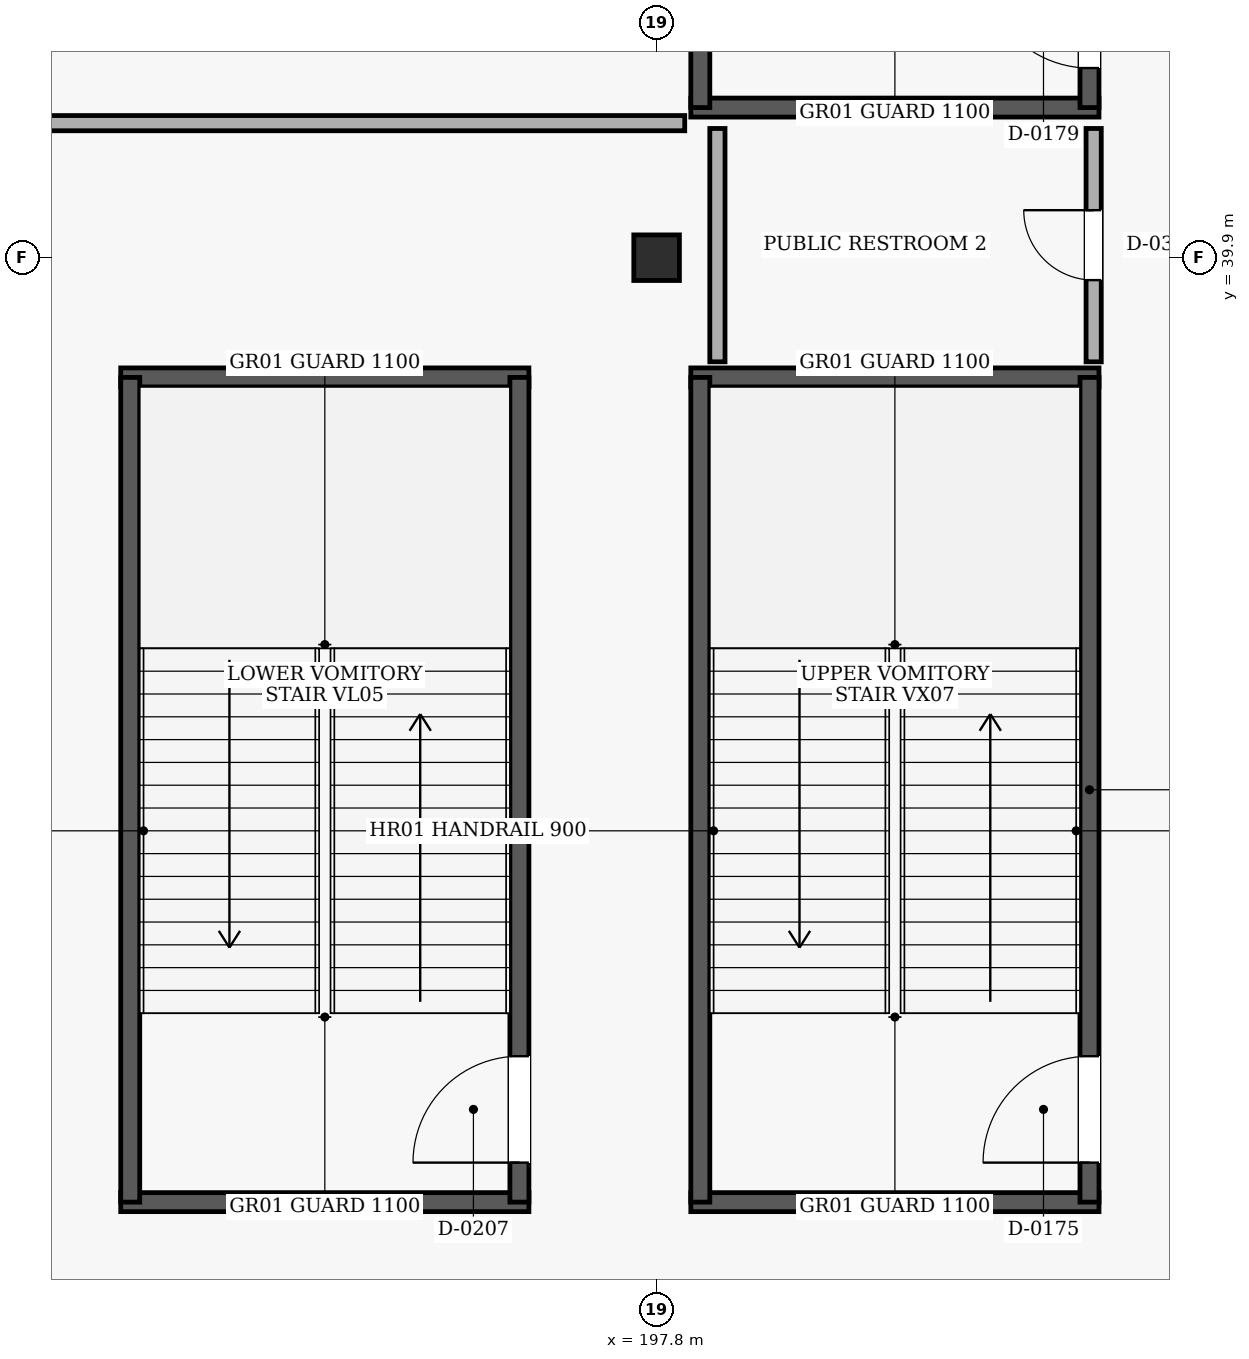
"""IFC4 building model, lengths in metres.
Left out: names, types, materials, properties, quantities, classifications, styles, units other than length and angle.
Written with IfcOpenShell. Run it as: python <this file> out.ifc"""

import sys

from ifc_helpers import new_model, si_unit, direction, frame, frame_2d, origin, origin_2d, place, context, subcontext, project, spatial, rectangle, extrude, element, fill, save


model = new_model("IFC4")
c1 = context("Model", 3, precision=1e-05, world=origin(), true_north=direction((0.0, 1.0)))
c2 = subcontext(c1, "Body", "Model", "MODEL_VIEW")
j1 = project(units=[si_unit("LENGTHUNIT", "METRE"), si_unit("PLANEANGLEUNIT", "RADIAN")], contexts=[c1])
p1 = place(None, origin())
s1 = spatial("IfcSite", under=j1, at=p1, CompositionType="ELEMENT")
p2 = place(p1, origin())
s2 = spatial("IfcBuilding", under=s1, at=p2, CompositionType="ELEMENT")
p3 = place(p2, origin())
s3 = spatial("IfcBuildingStorey", under=s2, at=p3, CompositionType="ELEMENT", Elevation=0.0)
p4 = place(p3, frame((197.8, 39.9, 0.0), z_axis=(0.0, 0.0, 1.0), x_axis=(1.0, 0.0, 0.0)))
e1 = element("IfcColumn", 1, at=p4, inside=s3, PredefinedType="COLUMN", context=c2, shape_type="SweptSolid", body=[
    extrude(rectangle(XDim=0.6, YDim=0.6, at=origin_2d()), origin(), (0.0, 0.0, 1.0), 5.4),
])
for number, where, z_axis, x_axis in (
    (2, (198.25, 27.475, 0.0), (0.0, 0.0, 1.0), (1.0, 0.0, 0.0)),
    (3, (203.62, 38.325, 0.0), (0.0, 0.0, 1.0), (-1.0, 0.0, 0.0)),
):
    element("IfcWall", number, at=place(p3, frame(where, z_axis=z_axis, x_axis=x_axis)), inside=s3, PredefinedType="SHEAR", context=c2, shape_type="SweptSolid", body=[
        extrude(rectangle(XDim=5.37, YDim=0.25, at=frame_2d((2.685, 0.0))), origin(), (0.0, 0.0, 1.0), 5.08),
    ])
p5 = place(p3, frame((198.375, 27.475, 0.0), z_axis=(0.0, 0.0, 1.0), x_axis=(0.0, 1.0, 0.0)))
e4 = element("IfcWall", 4, at=p5, inside=s3, PredefinedType="SHEAR", context=c2, shape_type="SweptSolid", body=[
    extrude(rectangle(XDim=10.85, YDim=0.25, at=frame_2d((5.425, 0.0))), origin(), (0.0, 0.0, 1.0), 5.08),
])
p6 = place(p3, frame((203.495, 27.475, 0.0), z_axis=(0.0, 0.0, 1.0), x_axis=(0.0, 1.0, 0.0)))
e5 = element("IfcWall", 5, at=p6, inside=s3, PredefinedType="SHEAR", context=c2, shape_type="SweptSolid", body=[
    extrude(rectangle(XDim=10.85, YDim=0.25, at=frame_2d((5.425, 0.0))), origin(), (0.0, 0.0, 1.0), 5.08),
])
p7 = place(p6, frame((0.52, 0.0, 0.0)))
e6 = element("IfcOpeningElement", 6, at=p7, cuts=e5, PredefinedType="OPENING", context=c2, shape_type="SweptSolid", body=[
    extrude(rectangle(XDim=1.4, YDim=2.15, at=frame_2d((0.7, 1.075))), frame((0.0, 0.135, 0.0), z_axis=(0.0, -1.0, 0.0), x_axis=(1.0, 0.0, 0.0)), (0.0, 0.0, 1.0), 0.27),
])
p8 = place(p3, frame((198.25, 41.875, 0.0), z_axis=(0.0, 0.0, 1.0), x_axis=(1.0, 0.0, 0.0)))
e7 = element("IfcWall", 7, at=p8, inside=s3, PredefinedType="SHEAR", context=c2, shape_type="SweptSolid", body=[
    extrude(rectangle(XDim=5.37, YDim=0.25, at=frame_2d((2.685, 0.0))), origin(), (0.0, 0.0, 1.0), 5.08),
])
p9 = place(p3, frame((198.375, 41.875, 0.0), z_axis=(0.0, 0.0, 1.0), x_axis=(0.0, 1.0, 0.0)))
e8 = element("IfcWall", 8, at=p9, inside=s3, PredefinedType="SHEAR", context=c2, shape_type="SweptSolid", body=[
    extrude(rectangle(XDim=10.85, YDim=0.25, at=frame_2d((5.425, 0.0))), origin(), (0.0, 0.0, 1.0), 5.08),
])
p10 = place(p3, frame((203.495, 41.875, 0.0), z_axis=(0.0, 0.0, 1.0), x_axis=(0.0, 1.0, 0.0)))
e9 = element("IfcWall", 9, at=p10, inside=s3, PredefinedType="SHEAR", context=c2, shape_type="SweptSolid", body=[
    extrude(rectangle(XDim=10.85, YDim=0.25, at=frame_2d((5.425, 0.0))), origin(), (0.0, 0.0, 1.0), 5.08),
])
p11 = place(p10, frame((0.52, 0.0, 0.0)))
e10 = element("IfcOpeningElement", 10, at=p11, cuts=e9, PredefinedType="OPENING", context=c2, shape_type="SweptSolid", body=[
    extrude(rectangle(XDim=1.4, YDim=2.15, at=frame_2d((0.7, 1.075))), frame((0.0, 0.135, 0.0), z_axis=(0.0, -1.0, 0.0), x_axis=(1.0, 0.0, 0.0)), (0.0, 0.0, 1.0), 0.27),
])
for number, where, z_axis, x_axis in (
    (11, (190.75, 27.475, 0.0), (0.0, 0.0, 1.0), (1.0, 0.0, 0.0)),
    (12, (196.12, 38.325, 0.0), (0.0, 0.0, 1.0), (-1.0, 0.0, 0.0)),
):
    element("IfcWall", number, at=place(p3, frame(where, z_axis=z_axis, x_axis=x_axis)), inside=s3, PredefinedType="SHEAR", context=c2, shape_type="SweptSolid", body=[
        extrude(rectangle(XDim=5.37, YDim=0.25, at=frame_2d((2.685, 0.0))), origin(), (0.0, 0.0, 1.0), 5.08),
    ])
p12 = place(p3, frame((190.875, 27.475, 0.0), z_axis=(0.0, 0.0, 1.0), x_axis=(0.0, 1.0, 0.0)))
e13 = element("IfcWall", 13, at=p12, inside=s3, PredefinedType="SHEAR", context=c2, shape_type="SweptSolid", body=[
    extrude(rectangle(XDim=10.85, YDim=0.25, at=frame_2d((5.425, 0.0))), origin(), (0.0, 0.0, 1.0), 5.08),
])
p13 = place(p3, frame((195.995, 27.475, 0.0), z_axis=(0.0, 0.0, 1.0), x_axis=(0.0, 1.0, 0.0)))
e14 = element("IfcWall", 14, at=p13, inside=s3, PredefinedType="SHEAR", context=c2, shape_type="SweptSolid", body=[
    extrude(rectangle(XDim=10.85, YDim=0.25, at=frame_2d((5.425, 0.0))), origin(), (0.0, 0.0, 1.0), 5.08),
])
p14 = place(p13, frame((0.52, 0.0, 0.0)))
e15 = element("IfcOpeningElement", 15, at=p14, cuts=e14, PredefinedType="OPENING", context=c2, shape_type="SweptSolid", body=[
    extrude(rectangle(XDim=1.4, YDim=2.15, at=frame_2d((0.7, 1.075))), frame((0.0, 0.135, 0.0), z_axis=(0.0, -1.0, 0.0), x_axis=(1.0, 0.0, 0.0)), (0.0, 0.0, 1.0), 0.27),
])
p15 = place(p3, frame((203.55, 38.53, 0.0), z_axis=(0.0, 0.0, 1.0), x_axis=(0.0, 1.0, 0.0)))
e16 = element("IfcWall", 16, at=p15, inside=s3, PredefinedType="PARTITIONING", context=c2, shape_type="SweptSolid", body=[
    extrude(rectangle(XDim=3.07, YDim=0.2, at=frame_2d((1.535, 0.0))), origin(), (0.0, 0.0, 1.0), 5.08),
])
p16 = place(p15, frame((1.075, 0.0, 0.0)))
e17 = element("IfcOpeningElement", 17, at=p16, cuts=e16, PredefinedType="OPENING", context=c2, shape_type="SweptSolid", body=[
    extrude(rectangle(XDim=0.92, YDim=2.1, at=frame_2d((0.46, 1.05))), frame((0.0, 0.11, 0.0), z_axis=(0.0, -1.0, 0.0), x_axis=(1.0, 0.0, 0.0)), (0.0, 0.0, 1.0), 0.22),
])
p17 = place(p3, frame((198.6, 41.6, 0.0), z_axis=(0.0, 0.0, 1.0), x_axis=(0.0, -1.0, 0.0)))
e18 = element("IfcWall", 18, at=p17, inside=s3, PredefinedType="PARTITIONING", context=c2, shape_type="SweptSolid", body=[
    extrude(rectangle(XDim=3.07, YDim=0.2, at=frame_2d((1.535, 0.0))), origin(), (0.0, 0.0, 1.0), 5.08),
])
p18 = place(p3, frame((175.6, 41.67, 0.0), z_axis=(0.0, 0.0, 1.0), x_axis=(1.0, 0.0, 0.0)))
e19 = element("IfcWall", 19, at=p18, inside=s3, PredefinedType="PARTITIONING", context=c2, shape_type="SweptSolid", body=[
    extrude(rectangle(XDim=22.57, YDim=0.2, at=frame_2d((11.285, 0.0))), origin(), (0.0, 0.0, 1.0), 5.08),
])
p19 = place(p7, frame((1.4, 0.0, 0.0), z_axis=(0.0, 0.0, 1.0), x_axis=(-1.0, 0.0, 0.0)))
e20 = element("IfcDoor", 20, at=p19, inside=s3, OperationType="SINGLE_SWING_RIGHT", PredefinedType="DOOR", context=c2, shape_type="SweptSolid", body=[
    extrude(rectangle(XDim=1.4, YDim=2.15, at=frame_2d((0.7, 1.075))), frame((0.0, 0.025, 0.0), z_axis=(0.0, -1.0, 0.0), x_axis=(1.0, 0.0, 0.0)), (0.0, 0.0, 1.0), 0.05),
])
fill(e6, e20)
p20 = place(p11, frame((1.4, 0.0, 0.0), z_axis=(0.0, 0.0, 1.0), x_axis=(-1.0, 0.0, 0.0)))
e21 = element("IfcDoor", 21, at=p20, inside=s3, OperationType="SINGLE_SWING_LEFT", PredefinedType="DOOR", context=c2, shape_type="SweptSolid", body=[
    extrude(rectangle(XDim=1.4, YDim=2.15, at=frame_2d((0.7, 1.075))), frame((0.0, 0.025, 0.0), z_axis=(0.0, -1.0, 0.0), x_axis=(1.0, 0.0, 0.0)), (0.0, 0.0, 1.0), 0.05),
])
fill(e10, e21)
p21 = place(p14, frame((1.4, 0.0, 0.0), z_axis=(0.0, 0.0, 1.0), x_axis=(-1.0, 0.0, 0.0)))
e22 = element("IfcDoor", 22, at=p21, inside=s3, OperationType="SINGLE_SWING_RIGHT", PredefinedType="DOOR", context=c2, shape_type="SweptSolid", body=[
    extrude(rectangle(XDim=1.4, YDim=2.15, at=frame_2d((0.7, 1.075))), frame((0.0, 0.025, 0.0), z_axis=(0.0, -1.0, 0.0), x_axis=(1.0, 0.0, 0.0)), (0.0, 0.0, 1.0), 0.05),
])
fill(e15, e22)
p22 = place(p16, origin())
e23 = element("IfcDoor", 23, at=p22, inside=s3, OperationType="SINGLE_SWING_RIGHT", PredefinedType="DOOR", context=c2, shape_type="SweptSolid", body=[
    extrude(rectangle(XDim=0.92, YDim=2.1, at=frame_2d((0.46, 1.05))), frame((0.0, 0.025, 0.0), z_axis=(0.0, -1.0, 0.0), x_axis=(1.0, 0.0, 0.0)), (0.0, 0.0, 1.0), 0.05),
])
fill(e17, e23)
save(model, sys.argv[1])
